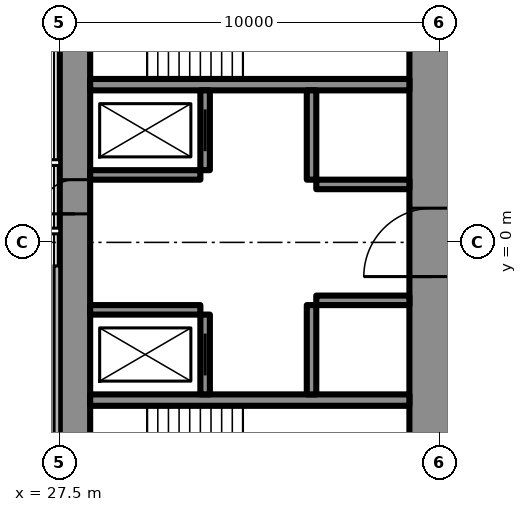
"""IFC4 building model, lengths in metres.
Left out: names, types, materials, properties, quantities, classifications, styles, units other than length and angle.
Written with IfcOpenShell. Run it as: python <this file> out.ifc"""

import sys

from ifc_helpers import new_model, si_unit, direction, frame, frame_2d, origin, place, context, subcontext, project, spatial, rectangle, extrude, element, fill, save


model = new_model("IFC4")
c1 = context("Model", 3, precision=1e-05, world=origin(), true_north=direction((0.0, 1.0)))
c2 = subcontext(c1, "Body", "Model", "MODEL_VIEW")
j1 = project(units=[si_unit("LENGTHUNIT", "METRE"), si_unit("PLANEANGLEUNIT", "RADIAN")], contexts=[c1])
p1 = place(None, origin())
s1 = spatial("IfcSite", under=j1, at=p1, CompositionType="ELEMENT")
p2 = place(p1, origin())
s2 = spatial("IfcBuilding", under=s1, at=p2, CompositionType="ELEMENT")
p3 = place(p2, frame((0.0, 0.0, 218.9)))
s3 = spatial("IfcBuildingStorey", under=s2, at=p3, CompositionType="ELEMENT", Elevation=218.9)
p4 = place(p3, frame((27.9, -8.6, 0.0), z_axis=(0.0, 0.0, 1.0), x_axis=(0.0, 1.0, 0.0)))
e1 = element("IfcWall", 1, at=p4, inside=s3, PredefinedType="SHEAR", context=c2, shape_type="SweptSolid", body=[
    extrude(rectangle(XDim=17.2, YDim=0.8, at=frame_2d((8.6, 0.0))), origin(), (0.0, 0.0, 1.0), 3.6),
])
p5 = place(p4, frame((9.35, 0.0, 0.0)))
e2 = element("IfcOpeningElement", 2, at=p5, cuts=e1, PredefinedType="OPENING", context=c2, shape_type="SweptSolid", body=[
    extrude(rectangle(XDim=0.9, YDim=2.2, at=frame_2d((0.45, 1.1))), frame((0.0, 0.41, 0.0), z_axis=(0.0, -1.0, 0.0), x_axis=(1.0, 0.0, 0.0)), (0.0, 0.0, 1.0), 0.82),
])
p6 = place(p3, frame((37.3, -8.6, 0.0), z_axis=(0.0, 0.0, 1.0), x_axis=(0.0, 1.0, 0.0)))
e3 = element("IfcWall", 3, at=p6, inside=s3, PredefinedType="SHEAR", context=c2, shape_type="SweptSolid", body=[
    extrude(rectangle(XDim=17.2, YDim=1.2, at=frame_2d((8.6, 0.0))), origin(), (0.0, 0.0, 1.0), 3.6),
])
p7 = place(p6, frame((7.7, 0.0, 0.0)))
e4 = element("IfcOpeningElement", 4, at=p7, cuts=e3, PredefinedType="OPENING", context=c2, shape_type="SweptSolid", body=[
    extrude(rectangle(XDim=1.8, YDim=2.2, at=frame_2d((0.9, 1.1))), frame((0.0, 0.61, 0.0), z_axis=(0.0, -1.0, 0.0), x_axis=(1.0, 0.0, 0.0)), (0.0, 0.0, 1.0), 1.22),
])
for number, where, z_axis, x_axis in (
    (5, (28.3, -4.15, 0.0), (0.0, 0.0, 1.0), (1.0, 0.0, 0.0)),
    (6, (28.3, 4.15, 0.0), (0.0, 0.0, 1.0), (1.0, 0.0, 0.0)),
):
    element("IfcWall", number, at=place(p3, frame(where, z_axis=z_axis, x_axis=x_axis)), inside=s3, PredefinedType="SHEAR", context=c2, shape_type="SweptSolid", body=[
        extrude(rectangle(XDim=8.4, YDim=0.3, at=frame_2d((4.2, 0.0))), origin(), (0.0, 0.0, 1.0), 3.6),
    ])
p8 = place(p3, frame((31.325, -4.0, 0.0), z_axis=(0.0, 0.0, 1.0), x_axis=(0.0, 1.0, 0.0)))
e7 = element("IfcWall", 7, at=p8, inside=s3, PredefinedType="SHEAR", context=c2, shape_type="SweptSolid", body=[
    extrude(rectangle(XDim=2.1, YDim=0.25, at=frame_2d((1.05, 0.0))), origin(), (0.0, 0.0, 1.0), 3.6),
])
p9 = place(p8, frame((0.5, 0.0, 0.0)))
e8 = element("IfcOpeningElement", 8, at=p9, cuts=e7, PredefinedType="OPENING", context=c2, shape_type="SweptSolid", body=[
    extrude(rectangle(XDim=1.1, YDim=2.2, at=frame_2d((0.55, 1.1))), frame((0.0, 0.135, 0.0), z_axis=(0.0, -1.0, 0.0), x_axis=(1.0, 0.0, 0.0)), (0.0, 0.0, 1.0), 0.27),
])
p10 = place(p3, frame((34.125, -4.0, 0.0), z_axis=(0.0, 0.0, 1.0), x_axis=(0.0, 1.0, 0.0)))
e9 = element("IfcWall", 9, at=p10, inside=s3, PredefinedType="SHEAR", context=c2, shape_type="SweptSolid", body=[
    extrude(rectangle(XDim=2.35, YDim=0.25, at=frame_2d((1.175, 0.0))), origin(), (0.0, 0.0, 1.0), 3.6),
])
p11 = place(p3, frame((28.3, -1.775, 0.0), z_axis=(0.0, 0.0, 1.0), x_axis=(1.0, 0.0, 0.0)))
e10 = element("IfcWall", 10, at=p11, inside=s3, PredefinedType="SHEAR", context=c2, shape_type="SweptSolid", body=[
    extrude(rectangle(XDim=2.9, YDim=0.25, at=frame_2d((1.45, 0.0))), origin(), (0.0, 0.0, 1.0), 3.6),
])
p12 = place(p3, frame((34.25, -1.525, 0.0), z_axis=(0.0, 0.0, 1.0), x_axis=(1.0, 0.0, 0.0)))
e11 = element("IfcWall", 11, at=p12, inside=s3, PredefinedType="SHEAR", context=c2, shape_type="SweptSolid", body=[
    extrude(rectangle(XDim=2.45, YDim=0.25, at=frame_2d((1.225, 0.0))), origin(), (0.0, 0.0, 1.0), 3.6),
])
p13 = place(p3, frame((31.325, 1.9, 0.0), z_axis=(0.0, 0.0, 1.0), x_axis=(0.0, 1.0, 0.0)))
e12 = element("IfcWall", 12, at=p13, inside=s3, PredefinedType="SHEAR", context=c2, shape_type="SweptSolid", body=[
    extrude(rectangle(XDim=2.1, YDim=0.25, at=frame_2d((1.05, 0.0))), origin(), (0.0, 0.0, 1.0), 3.6),
])
p14 = place(p13, frame((0.5, 0.0, 0.0)))
e13 = element("IfcOpeningElement", 13, at=p14, cuts=e12, PredefinedType="OPENING", context=c2, shape_type="SweptSolid", body=[
    extrude(rectangle(XDim=1.1, YDim=2.2, at=frame_2d((0.55, 1.1))), frame((0.0, 0.135, 0.0), z_axis=(0.0, -1.0, 0.0), x_axis=(1.0, 0.0, 0.0)), (0.0, 0.0, 1.0), 0.27),
])
p15 = place(p3, frame((34.125, 1.65, 0.0), z_axis=(0.0, 0.0, 1.0), x_axis=(0.0, 1.0, 0.0)))
e14 = element("IfcWall", 14, at=p15, inside=s3, PredefinedType="SHEAR", context=c2, shape_type="SweptSolid", body=[
    extrude(rectangle(XDim=2.35, YDim=0.25, at=frame_2d((1.175, 0.0))), origin(), (0.0, 0.0, 1.0), 3.6),
])
p16 = place(p3, frame((28.3, 1.775, 0.0), z_axis=(0.0, 0.0, 1.0), x_axis=(1.0, 0.0, 0.0)))
e15 = element("IfcWall", 15, at=p16, inside=s3, PredefinedType="SHEAR", context=c2, shape_type="SweptSolid", body=[
    extrude(rectangle(XDim=2.9, YDim=0.25, at=frame_2d((1.45, 0.0))), origin(), (0.0, 0.0, 1.0), 3.6),
])
p17 = place(p3, frame((34.25, 1.525, 0.0), z_axis=(0.0, 0.0, 1.0), x_axis=(1.0, 0.0, 0.0)))
e16 = element("IfcWall", 16, at=p17, inside=s3, PredefinedType="SHEAR", context=c2, shape_type="SweptSolid", body=[
    extrude(rectangle(XDim=2.45, YDim=0.25, at=frame_2d((1.225, 0.0))), origin(), (0.0, 0.0, 1.0), 3.6),
])
p18 = place(p3, frame((27.2, -13.8, 0.0), z_axis=(0.0, 0.0, 1.0), x_axis=(0.866027159892, 0.499996958321, 0.0)))
e17 = element("IfcWall", 17, at=p18, inside=s3, PredefinedType="SHEAR", context=c2, shape_type="SweptSolid", body=[
    extrude(rectangle(XDim=27.947, YDim=1.2, at=frame_2d((13.973, 0.0))), origin(), (0.0, 0.0, 1.0), 3.6),
])
p19 = place(p18, frame((4.6, 0.0, 0.0)))
e18 = element("IfcOpeningElement", 18, at=p19, cuts=e17, PredefinedType="OPENING", context=c2, shape_type="SweptSolid", body=[
    extrude(rectangle(XDim=1.0, YDim=2.2, at=frame_2d((0.5, 1.1))), frame((0.0, 0.61, 0.0), z_axis=(0.0, -1.0, 0.0), x_axis=(1.0, 0.0, 0.0)), (0.0, 0.0, 1.0), 1.22),
])
p20 = place(p18, frame((13.395, 0.0, 0.0)))
e19 = element("IfcOpeningElement", 19, at=p20, cuts=e17, PredefinedType="OPENING", context=c2, shape_type="SweptSolid", body=[
    extrude(rectangle(XDim=1.8, YDim=2.2, at=frame_2d((0.9, 1.1))), frame((0.0, 0.61, 0.0), z_axis=(0.0, -1.0, 0.0), x_axis=(1.0, 0.0, 0.0)), (0.0, 0.0, 1.0), 1.22),
])
p21 = place(p3, frame((27.2, 13.8, 0.0), z_axis=(0.0, 0.0, 1.0), x_axis=(0.866024515034, -0.500001539357, 0.0)))
e20 = element("IfcWall", 20, at=p21, inside=s3, PredefinedType="SHEAR", context=c2, shape_type="SweptSolid", body=[
    extrude(rectangle(XDim=26.907, YDim=1.2, at=frame_2d((13.454, 0.0))), origin(), (0.0, 0.0, 1.0), 3.6),
])
p22 = place(p21, frame((4.6, 0.0, 0.0)))
e21 = element("IfcOpeningElement", 21, at=p22, cuts=e20, PredefinedType="OPENING", context=c2, shape_type="SweptSolid", body=[
    extrude(rectangle(XDim=1.0, YDim=2.2, at=frame_2d((0.5, 1.1))), frame((0.0, 0.61, 0.0), z_axis=(0.0, -1.0, 0.0), x_axis=(1.0, 0.0, 0.0)), (0.0, 0.0, 1.0), 1.22),
])
p23 = place(p21, frame((13.395, 0.0, 0.0)))
e22 = element("IfcOpeningElement", 22, at=p23, cuts=e20, PredefinedType="OPENING", context=c2, shape_type="SweptSolid", body=[
    extrude(rectangle(XDim=1.8, YDim=2.2, at=frame_2d((0.9, 1.1))), frame((0.0, 0.61, 0.0), z_axis=(0.0, -1.0, 0.0), x_axis=(1.0, 0.0, 0.0)), (0.0, 0.0, 1.0), 1.22),
])
p24 = place(p3, frame((28.959, -15.44, 0.0), z_axis=(0.0, 0.0, 1.0), x_axis=(0.866025227435, 0.500000305447, 0.0)))
e23 = element("IfcWall", 23, at=p24, inside=s3, PredefinedType="PARTITIONING", context=c2, shape_type="SweptSolid", body=[
    extrude(rectangle(XDim=30.88, YDim=0.2, at=frame_2d((15.44, 0.0))), origin(), (0.0, 0.0, 1.0), 3.35),
])
p25 = place(p24, frame((1.494, 0.0, 0.0)))
e24 = element("IfcOpeningElement", 24, at=p25, cuts=e23, PredefinedType="OPENING", context=c2, shape_type="SweptSolid", body=[
    extrude(rectangle(XDim=1.8, YDim=2.03, at=frame_2d((0.9, 1.015))), frame((0.0, 0.11, 0.0), z_axis=(0.0, -1.0, 0.0), x_axis=(1.0, 0.0, 0.0)), (0.0, 0.0, 1.0), 0.22),
])
p26 = place(p24, frame((7.687, 0.0, 0.0)))
e25 = element("IfcOpeningElement", 25, at=p26, cuts=e23, PredefinedType="OPENING", context=c2, shape_type="SweptSolid", body=[
    extrude(rectangle(XDim=1.0, YDim=2.2, at=frame_2d((0.5, 1.1))), frame((0.0, 0.11, 0.0), z_axis=(0.0, -1.0, 0.0), x_axis=(1.0, 0.0, 0.0)), (0.0, 0.0, 1.0), 0.22),
])
p27 = place(p24, frame((16.137, 0.0, 0.0)))
e26 = element("IfcOpeningElement", 26, at=p27, cuts=e23, PredefinedType="OPENING", context=c2, shape_type="SweptSolid", body=[
    extrude(rectangle(XDim=0.95, YDim=2.2, at=frame_2d((0.475, 1.1))), frame((0.0, 0.11, 0.0), z_axis=(0.0, -1.0, 0.0), x_axis=(1.0, 0.0, 0.0)), (0.0, 0.0, 1.0), 0.22),
])
p28 = place(p24, frame((20.021, 0.0, 0.0)))
e27 = element("IfcOpeningElement", 27, at=p28, cuts=e23, PredefinedType="OPENING", context=c2, shape_type="SweptSolid", body=[
    extrude(rectangle(XDim=0.95, YDim=2.2, at=frame_2d((0.475, 1.1))), frame((0.0, 0.11, 0.0), z_axis=(0.0, -1.0, 0.0), x_axis=(1.0, 0.0, 0.0)), (0.0, 0.0, 1.0), 0.22),
])
p29 = place(p24, frame((26.253, 0.0, 0.0)))
e28 = element("IfcOpeningElement", 28, at=p29, cuts=e23, PredefinedType="OPENING", context=c2, shape_type="SweptSolid", body=[
    extrude(rectangle(XDim=0.95, YDim=2.2, at=frame_2d((0.475, 1.1))), frame((0.0, 0.11, 0.0), z_axis=(0.0, -1.0, 0.0), x_axis=(1.0, 0.0, 0.0)), (0.0, 0.0, 1.0), 0.22),
])
p30 = place(p3, frame((-27.5, 0.3, 0.0), z_axis=(0.0, 0.0, 1.0), x_axis=(1.0, 0.0, 0.0)))
e29 = element("IfcWall", 29, at=p30, inside=s3, PredefinedType="PARTITIONING", context=c2, shape_type="SweptSolid", body=[
    extrude(rectangle(XDim=55.0, YDim=0.15, at=frame_2d((27.5, 0.0))), origin(), (0.0, 0.0, 1.0), 2.4),
])
p31 = place(p30, frame((1.575, 0.0, 0.0)))
e30 = element("IfcOpeningElement", 30, at=p31, cuts=e29, PredefinedType="OPENING", context=c2, shape_type="SweptSolid", body=[
    extrude(rectangle(XDim=1.0, YDim=2.2, at=frame_2d((0.5, 1.1))), frame((0.0, 0.085, 0.0), z_axis=(0.0, -1.0, 0.0), x_axis=(1.0, 0.0, 0.0)), (0.0, 0.0, 1.0), 0.17),
])
p32 = place(p30, frame((8.525, 0.0, 0.0)))
e31 = element("IfcOpeningElement", 31, at=p32, cuts=e29, PredefinedType="OPENING", context=c2, shape_type="SweptSolid", body=[
    extrude(rectangle(XDim=1.05, YDim=2.4, at=frame_2d((0.525, 1.2))), frame((0.0, 0.085, 0.0), z_axis=(0.0, -1.0, 0.0), x_axis=(1.0, 0.0, 0.0)), (0.0, 0.0, 1.0), 0.17),
])
p33 = place(p30, frame((14.025, 0.0, 0.0)))
e32 = element("IfcOpeningElement", 32, at=p33, cuts=e29, PredefinedType="OPENING", context=c2, shape_type="SweptSolid", body=[
    extrude(rectangle(XDim=1.05, YDim=2.4, at=frame_2d((0.525, 1.2))), frame((0.0, 0.085, 0.0), z_axis=(0.0, -1.0, 0.0), x_axis=(1.0, 0.0, 0.0)), (0.0, 0.0, 1.0), 0.17),
])
p34 = place(p30, frame((19.525, 0.0, 0.0)))
e33 = element("IfcOpeningElement", 33, at=p34, cuts=e29, PredefinedType="OPENING", context=c2, shape_type="SweptSolid", body=[
    extrude(rectangle(XDim=1.05, YDim=2.4, at=frame_2d((0.525, 1.2))), frame((0.0, 0.085, 0.0), z_axis=(0.0, -1.0, 0.0), x_axis=(1.0, 0.0, 0.0)), (0.0, 0.0, 1.0), 0.17),
])
p35 = place(p30, frame((25.025, 0.0, 0.0)))
e34 = element("IfcOpeningElement", 34, at=p35, cuts=e29, PredefinedType="OPENING", context=c2, shape_type="SweptSolid", body=[
    extrude(rectangle(XDim=1.05, YDim=2.4, at=frame_2d((0.525, 1.2))), frame((0.0, 0.085, 0.0), z_axis=(0.0, -1.0, 0.0), x_axis=(1.0, 0.0, 0.0)), (0.0, 0.0, 1.0), 0.17),
])
p36 = place(p30, frame((30.525, 0.0, 0.0)))
e35 = element("IfcOpeningElement", 35, at=p36, cuts=e29, PredefinedType="OPENING", context=c2, shape_type="SweptSolid", body=[
    extrude(rectangle(XDim=1.05, YDim=2.4, at=frame_2d((0.525, 1.2))), frame((0.0, 0.085, 0.0), z_axis=(0.0, -1.0, 0.0), x_axis=(1.0, 0.0, 0.0)), (0.0, 0.0, 1.0), 0.17),
])
p37 = place(p30, frame((36.025, 0.0, 0.0)))
e36 = element("IfcOpeningElement", 36, at=p37, cuts=e29, PredefinedType="OPENING", context=c2, shape_type="SweptSolid", body=[
    extrude(rectangle(XDim=1.05, YDim=2.4, at=frame_2d((0.525, 1.2))), frame((0.0, 0.085, 0.0), z_axis=(0.0, -1.0, 0.0), x_axis=(1.0, 0.0, 0.0)), (0.0, 0.0, 1.0), 0.17),
])
p38 = place(p30, frame((41.525, 0.0, 0.0)))
e37 = element("IfcOpeningElement", 37, at=p38, cuts=e29, PredefinedType="OPENING", context=c2, shape_type="SweptSolid", body=[
    extrude(rectangle(XDim=1.05, YDim=2.4, at=frame_2d((0.525, 1.2))), frame((0.0, 0.085, 0.0), z_axis=(0.0, -1.0, 0.0), x_axis=(1.0, 0.0, 0.0)), (0.0, 0.0, 1.0), 0.17),
])
p39 = place(p30, frame((47.025, 0.0, 0.0)))
e38 = element("IfcOpeningElement", 38, at=p39, cuts=e29, PredefinedType="OPENING", context=c2, shape_type="SweptSolid", body=[
    extrude(rectangle(XDim=1.05, YDim=2.4, at=frame_2d((0.525, 1.2))), frame((0.0, 0.085, 0.0), z_axis=(0.0, -1.0, 0.0), x_axis=(1.0, 0.0, 0.0)), (0.0, 0.0, 1.0), 0.17),
])
p40 = place(p30, frame((52.525, 0.0, 0.0)))
e39 = element("IfcOpeningElement", 39, at=p40, cuts=e29, PredefinedType="OPENING", context=c2, shape_type="SweptSolid", body=[
    extrude(rectangle(XDim=1.05, YDim=2.4, at=frame_2d((0.525, 1.2))), frame((0.0, 0.085, 0.0), z_axis=(0.0, -1.0, 0.0), x_axis=(1.0, 0.0, 0.0)), (0.0, 0.0, 1.0), 0.17),
])
p41 = place(p3, frame((-27.5, 2.1, 0.0), z_axis=(0.0, 0.0, 1.0), x_axis=(1.0, 0.0, 0.0)))
e40 = element("IfcWall", 40, at=p41, inside=s3, PredefinedType="PARTITIONING", context=c2, shape_type="SweptSolid", body=[
    extrude(rectangle(XDim=55.0, YDim=0.15, at=frame_2d((27.5, 0.0))), origin(), (0.0, 0.0, 1.0), 3.4),
])
p42 = place(p41, frame((2.025, 0.0, 0.0)))
e41 = element("IfcOpeningElement", 41, at=p42, cuts=e40, PredefinedType="OPENING", context=c2, shape_type="SweptSolid", body=[
    extrude(rectangle(XDim=1.05, YDim=2.4, at=frame_2d((0.525, 1.2))), frame((0.0, 0.085, 0.0), z_axis=(0.0, -1.0, 0.0), x_axis=(1.0, 0.0, 0.0)), (0.0, 0.0, 1.0), 0.17),
])
p43 = place(p41, frame((8.525, 0.0, 0.0)))
e42 = element("IfcOpeningElement", 42, at=p43, cuts=e40, PredefinedType="OPENING", context=c2, shape_type="SweptSolid", body=[
    extrude(rectangle(XDim=1.05, YDim=2.4, at=frame_2d((0.525, 1.2))), frame((0.0, 0.085, 0.0), z_axis=(0.0, -1.0, 0.0), x_axis=(1.0, 0.0, 0.0)), (0.0, 0.0, 1.0), 0.17),
])
p44 = place(p41, frame((14.025, 0.0, 0.0)))
e43 = element("IfcOpeningElement", 43, at=p44, cuts=e40, PredefinedType="OPENING", context=c2, shape_type="SweptSolid", body=[
    extrude(rectangle(XDim=1.05, YDim=2.4, at=frame_2d((0.525, 1.2))), frame((0.0, 0.085, 0.0), z_axis=(0.0, -1.0, 0.0), x_axis=(1.0, 0.0, 0.0)), (0.0, 0.0, 1.0), 0.17),
])
p45 = place(p41, frame((19.525, 0.0, 0.0)))
e44 = element("IfcOpeningElement", 44, at=p45, cuts=e40, PredefinedType="OPENING", context=c2, shape_type="SweptSolid", body=[
    extrude(rectangle(XDim=1.05, YDim=2.4, at=frame_2d((0.525, 1.2))), frame((0.0, 0.085, 0.0), z_axis=(0.0, -1.0, 0.0), x_axis=(1.0, 0.0, 0.0)), (0.0, 0.0, 1.0), 0.17),
])
p46 = place(p41, frame((25.025, 0.0, 0.0)))
e45 = element("IfcOpeningElement", 45, at=p46, cuts=e40, PredefinedType="OPENING", context=c2, shape_type="SweptSolid", body=[
    extrude(rectangle(XDim=1.05, YDim=2.4, at=frame_2d((0.525, 1.2))), frame((0.0, 0.085, 0.0), z_axis=(0.0, -1.0, 0.0), x_axis=(1.0, 0.0, 0.0)), (0.0, 0.0, 1.0), 0.17),
])
p47 = place(p41, frame((30.525, 0.0, 0.0)))
e46 = element("IfcOpeningElement", 46, at=p47, cuts=e40, PredefinedType="OPENING", context=c2, shape_type="SweptSolid", body=[
    extrude(rectangle(XDim=1.05, YDim=2.4, at=frame_2d((0.525, 1.2))), frame((0.0, 0.085, 0.0), z_axis=(0.0, -1.0, 0.0), x_axis=(1.0, 0.0, 0.0)), (0.0, 0.0, 1.0), 0.17),
])
p48 = place(p41, frame((36.025, 0.0, 0.0)))
e47 = element("IfcOpeningElement", 47, at=p48, cuts=e40, PredefinedType="OPENING", context=c2, shape_type="SweptSolid", body=[
    extrude(rectangle(XDim=1.05, YDim=2.4, at=frame_2d((0.525, 1.2))), frame((0.0, 0.085, 0.0), z_axis=(0.0, -1.0, 0.0), x_axis=(1.0, 0.0, 0.0)), (0.0, 0.0, 1.0), 0.17),
])
p49 = place(p41, frame((41.525, 0.0, 0.0)))
e48 = element("IfcOpeningElement", 48, at=p49, cuts=e40, PredefinedType="OPENING", context=c2, shape_type="SweptSolid", body=[
    extrude(rectangle(XDim=1.05, YDim=2.4, at=frame_2d((0.525, 1.2))), frame((0.0, 0.085, 0.0), z_axis=(0.0, -1.0, 0.0), x_axis=(1.0, 0.0, 0.0)), (0.0, 0.0, 1.0), 0.17),
])
p50 = place(p41, frame((47.025, 0.0, 0.0)))
e49 = element("IfcOpeningElement", 49, at=p50, cuts=e40, PredefinedType="OPENING", context=c2, shape_type="SweptSolid", body=[
    extrude(rectangle(XDim=1.05, YDim=2.4, at=frame_2d((0.525, 1.2))), frame((0.0, 0.085, 0.0), z_axis=(0.0, -1.0, 0.0), x_axis=(1.0, 0.0, 0.0)), (0.0, 0.0, 1.0), 0.17),
])
p51 = place(p41, frame((52.525, 0.0, 0.0)))
e50 = element("IfcOpeningElement", 50, at=p51, cuts=e40, PredefinedType="OPENING", context=c2, shape_type="SweptSolid", body=[
    extrude(rectangle(XDim=1.05, YDim=2.4, at=frame_2d((0.525, 1.2))), frame((0.0, 0.085, 0.0), z_axis=(0.0, -1.0, 0.0), x_axis=(1.0, 0.0, 0.0)), (0.0, 0.0, 1.0), 0.17),
])
p52 = place(p7, origin())
e51 = element("IfcDoor", 51, at=p52, inside=s3, OperationType="DOUBLE_DOOR_SINGLE_SWING", PredefinedType="DOOR", context=c2, shape_type="SweptSolid", body=[
    extrude(rectangle(XDim=1.8, YDim=2.2, at=frame_2d((0.9, 1.1))), frame((0.0, 0.025, 0.0), z_axis=(0.0, -1.0, 0.0), x_axis=(1.0, 0.0, 0.0)), (0.0, 0.0, 1.0), 0.05),
])
fill(e4, e51)
p53 = place(p5, origin())
e52 = element("IfcDoor", 52, at=p53, inside=s3, OperationType="SINGLE_SWING_LEFT", PredefinedType="DOOR", context=c2, shape_type="SweptSolid", body=[
    extrude(rectangle(XDim=0.9, YDim=2.2, at=frame_2d((0.45, 1.1))), frame((0.0, 0.025, 0.0), z_axis=(0.0, -1.0, 0.0), x_axis=(1.0, 0.0, 0.0)), (0.0, 0.0, 1.0), 0.05),
])
fill(e2, e52)
p54 = place(p9, origin())
e53 = element("IfcDoor", 53, at=p54, inside=s3, OperationType="SLIDING_TO_LEFT", PredefinedType="USERDEFINED", context=c2, shape_type="SweptSolid", body=[
    extrude(rectangle(XDim=1.1, YDim=2.2, at=frame_2d((0.55, 1.1))), frame((0.0, 0.025, 0.0), z_axis=(0.0, -1.0, 0.0), x_axis=(1.0, 0.0, 0.0)), (0.0, 0.0, 1.0), 0.05),
])
fill(e8, e53)
p55 = place(p14, origin())
e54 = element("IfcDoor", 54, at=p55, inside=s3, OperationType="SLIDING_TO_LEFT", PredefinedType="USERDEFINED", context=c2, shape_type="SweptSolid", body=[
    extrude(rectangle(XDim=1.1, YDim=2.2, at=frame_2d((0.55, 1.1))), frame((0.0, 0.025, 0.0), z_axis=(0.0, -1.0, 0.0), x_axis=(1.0, 0.0, 0.0)), (0.0, 0.0, 1.0), 0.05),
])
fill(e13, e54)
save(model, sys.argv[1])
